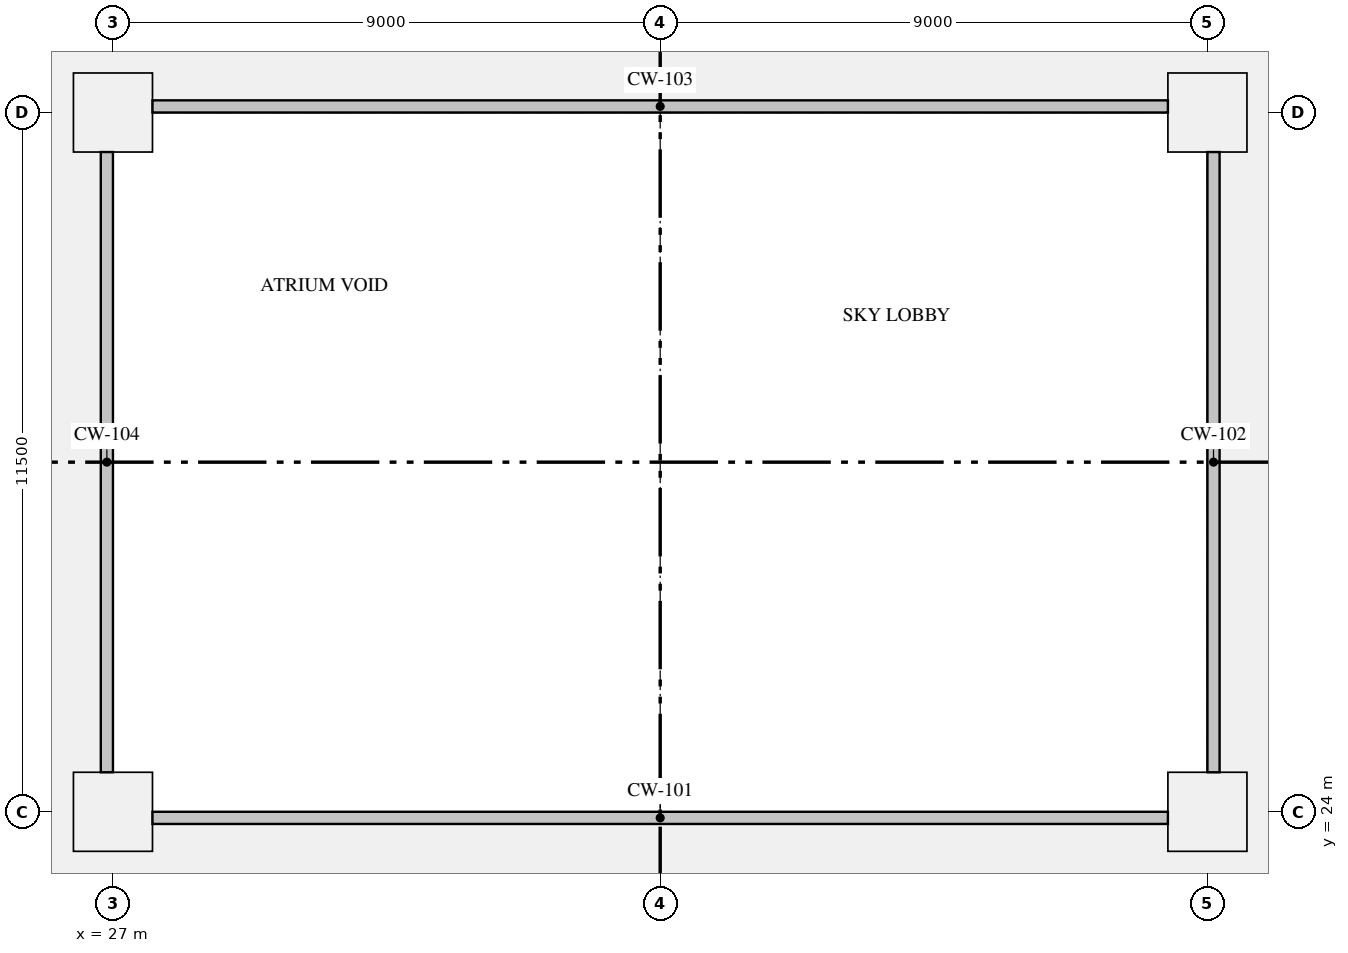
"""IFC4 building model, lengths in metres.
Left out: names, types, materials, properties, quantities, classifications, styles, units other than length and angle.
Written with IfcOpenShell. Run it as: python <this file> out.ifc"""

import sys

from ifc_helpers import new_model, si_unit, direction, frame, origin, origin_2d, place, context, subcontext, project, spatial, rectangle, extrude, element, save


model = new_model("IFC4")
c1 = context("Model", 3, precision=1e-05, world=origin(), true_north=direction((0.0, 1.0)))
c2 = subcontext(c1, "Body", "Model", "MODEL_VIEW")
j1 = project(units=[si_unit("LENGTHUNIT", "METRE"), si_unit("PLANEANGLEUNIT", "RADIAN")], contexts=[c1])
p1 = place(None, origin())
s1 = spatial("IfcSite", under=j1, at=p1, CompositionType="ELEMENT")
p2 = place(p1, origin())
s2 = spatial("IfcBuilding", under=s1, at=p2, CompositionType="ELEMENT")
p3 = place(p2, frame((0.0, 0.0, 77.25)))
s3 = spatial("IfcBuildingStorey", under=s2, at=p3, CompositionType="ELEMENT", Elevation=77.25)
for number, where, z_axis, x_axis in (
    (1, (27.0, 24.0, 0.0), (0.0, 0.0, 1.0), (1.0, 0.0, 0.0)),
    (2, (45.0, 24.0, 0.0), (0.0, 0.0, 1.0), (1.0, 0.0, 0.0)),
    (3, (27.0, 35.5, 0.0), (0.0, 0.0, 1.0), (1.0, 0.0, 0.0)),
    (4, (45.0, 35.5, 0.0), (0.0, 0.0, 1.0), (1.0, 0.0, 0.0)),
):
    element("IfcColumn", number, at=place(p3, frame(where, z_axis=z_axis, x_axis=x_axis)), inside=s3, PredefinedType="COLUMN", context=c2, shape_type="SweptSolid", body=[
        extrude(rectangle(XDim=1.3, YDim=1.3, at=origin_2d()), origin(), (0.0, 0.0, 1.0), 6.3),
    ])
save(model, sys.argv[1])
